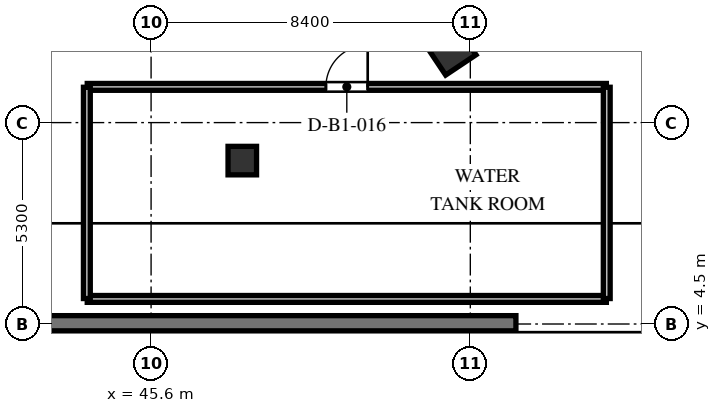
"""IFC4 building model, lengths in metres.
Left out: names, types, materials, properties, quantities, classifications, styles, units other than length and angle.
Written with IfcOpenShell. Run it as: python <this file> out.ifc"""

import sys

from ifc_helpers import new_model, si_unit, direction, frame, frame_2d, origin, origin_2d, place, context, subcontext, project, spatial, rectangle, extrude, element, fill, save


model = new_model("IFC4")
c1 = context("Model", 3, precision=1e-05, world=origin(), true_north=direction((0.0, 1.0)))
c2 = subcontext(c1, "Body", "Model", "MODEL_VIEW")
j1 = project(units=[si_unit("LENGTHUNIT", "METRE"), si_unit("PLANEANGLEUNIT", "RADIAN")], contexts=[c1])
p1 = place(None, origin())
s1 = spatial("IfcSite", under=j1, at=p1, CompositionType="ELEMENT")
p2 = place(p1, origin())
s2 = spatial("IfcBuilding", under=s1, at=p2, CompositionType="ELEMENT")
p3 = place(p2, frame((0.0, 0.0, -5.4)))
s3 = spatial("IfcBuildingStorey", under=s2, at=p3, CompositionType="ELEMENT", Elevation=-5.4)
p4 = place(p3, frame((53.362, 11.9, 0.0), z_axis=(0.0, 0.0, 1.0), x_axis=(0.55557023302, -0.831469612303, 0.0)))
e1 = element("IfcColumn", 1, at=p4, inside=s3, PredefinedType="COLUMN", context=c2, shape_type="SweptSolid", body=[
    extrude(rectangle(XDim=1.4, YDim=0.96, at=origin_2d()), origin(), (0.0, 0.0, 1.0), 5.4),
])
p5 = place(p3, frame((48.0, 8.8, 0.0), z_axis=(0.0, 0.0, 1.0), x_axis=(1.0, 0.0, 0.0)))
e2 = element("IfcColumn", 2, at=p5, inside=s3, PredefinedType="COLUMN", context=c2, shape_type="SweptSolid", body=[
    extrude(rectangle(XDim=0.75, YDim=0.75, at=origin_2d()), origin(), (0.0, 0.0, 1.0), 5.4),
])
p6 = place(p3, frame((26.8, 4.52, 0.0), z_axis=(0.0, 0.0, 1.0), x_axis=(1.0, 0.0, 0.0)))
e3 = element("IfcWall", 3, at=p6, inside=s3, PredefinedType="SHEAR", context=c2, shape_type="SweptSolid", body=[
    extrude(rectangle(XDim=28.4, YDim=0.4, at=frame_2d((14.2, 0.0))), origin(), (0.0, 0.0, 1.0), 5.1),
])
p7 = place(p3, frame((43.92, 10.74, 0.0), z_axis=(0.0, 0.0, 1.0), x_axis=(1.0, 0.0, 0.0)))
e4 = element("IfcWall", 4, at=p7, inside=s3, PredefinedType="PARTITIONING", context=c2, shape_type="SweptSolid", body=[
    extrude(rectangle(XDim=13.66, YDim=0.18, at=frame_2d((6.83, 0.0))), origin(), (0.0, 0.0, 1.0), 5.12),
])
p8 = place(p7, frame((6.28, 0.0, 0.0)))
e5 = element("IfcOpeningElement", 5, at=p8, cuts=e4, PredefinedType="OPENING", context=c2, shape_type="SweptSolid", body=[
    extrude(rectangle(XDim=1.1, YDim=2.15, at=frame_2d((0.55, 1.075))), frame((0.0, 0.1, 0.0), z_axis=(0.0, -1.0, 0.0), x_axis=(1.0, 0.0, 0.0)), (0.0, 0.0, 1.0), 0.2),
])
p9 = place(p3, frame((43.92, 5.16, 0.0), z_axis=(0.0, 0.0, 1.0), x_axis=(1.0, 0.0, 0.0)))
e6 = element("IfcWall", 6, at=p9, inside=s3, PredefinedType="PARTITIONING", context=c2, shape_type="SweptSolid", body=[
    extrude(rectangle(XDim=13.66, YDim=0.18, at=frame_2d((6.83, 0.0))), origin(), (0.0, 0.0, 1.0), 5.12),
])
for number, where, z_axis, x_axis in (
    (7, (57.59, 5.17, 0.0), (0.0, 0.0, 1.0), (0.0, 1.0, 0.0)),
    (8, (43.91, 5.17, 0.0), (0.0, 0.0, 1.0), (0.0, 1.0, 0.0)),
):
    element("IfcWall", number, at=place(p3, frame(where, z_axis=z_axis, x_axis=x_axis)), inside=s3, PredefinedType="PARTITIONING", context=c2, shape_type="SweptSolid", body=[
        extrude(rectangle(XDim=5.56, YDim=0.18, at=frame_2d((2.78, 0.0))), origin(), (0.0, 0.0, 1.0), 5.12),
    ])
p10 = place(p8, origin())
e9 = element("IfcDoor", 9, at=p10, inside=s3, OperationType="SINGLE_SWING_RIGHT", PredefinedType="DOOR", context=c2, shape_type="SweptSolid", body=[
    extrude(rectangle(XDim=1.1, YDim=2.15, at=frame_2d((0.55, 1.075))), frame((0.0, 0.025, 0.0), z_axis=(0.0, -1.0, 0.0), x_axis=(1.0, 0.0, 0.0)), (0.0, 0.0, 1.0), 0.05),
])
fill(e5, e9)
save(model, sys.argv[1])
